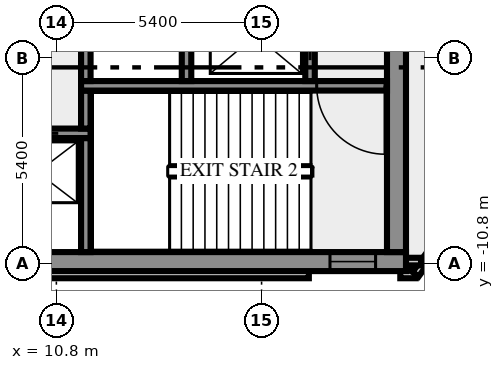
"""IFC4 building model, lengths in metres.
Left out: names, types, materials, properties, quantities, classifications, styles, units other than length and angle.
Written with IfcOpenShell. Run it as: python <this file> out.ifc"""

import sys

from ifc_helpers import new_model, si_unit, direction, frame, frame_2d, origin, place, context, subcontext, project, spatial, rectangle, extrude, element, fill, save


model = new_model("IFC4")
c1 = context("Model", 3, precision=1e-05, world=origin(), true_north=direction((0.0, 1.0)))
c2 = subcontext(c1, "Body", "Model", "MODEL_VIEW")
j1 = project(units=[si_unit("LENGTHUNIT", "METRE"), si_unit("PLANEANGLEUNIT", "RADIAN")], contexts=[c1])
p1 = place(None, origin())
s1 = spatial("IfcSite", under=j1, at=p1, CompositionType="ELEMENT")
p2 = place(p1, origin())
s2 = spatial("IfcBuilding", under=s1, at=p2, CompositionType="ELEMENT")
p3 = place(p2, frame((0.0, 0.0, 202.0)))
s3 = spatial("IfcBuildingStorey", under=s2, at=p3, CompositionType="ELEMENT", Elevation=202.0)
p4 = place(p3, frame((-17.444, -11.088, 0.0), z_axis=(0.0, 0.0, 1.0), x_axis=(1.0, 0.0, 0.0)))
e1 = element("IfcWall", 1, at=p4, inside=s3, PredefinedType="SOLIDWALL", context=c2, shape_type="SweptSolid", body=[
    extrude(rectangle(XDim=34.888, YDim=0.2, at=frame_2d((17.444, 0.0))), origin(), (0.0, 0.0, 1.0), 3.65),
])
p5 = place(p3, frame((19.85, -11.088, 0.0), z_axis=(0.0, 0.0, 1.0), x_axis=(1.0, 0.0, 0.0)))
e2 = element("IfcWall", 2, at=p5, inside=s3, PredefinedType="SOLIDWALL", context=c2, shape_type="SweptSolid", body=[
    extrude(rectangle(XDim=0.406, YDim=0.2, at=frame_2d((0.203, 0.0))), origin(), (0.0, 0.0, 1.0), 3.65),
])
p6 = place(p3, frame((20.253, -11.083, 0.0), z_axis=(0.0, 0.0, 1.0), x_axis=(0.587766567315, 0.809030569476, 0.0)))
e3 = element("IfcWall", 3, at=p6, inside=s3, PredefinedType="SOLIDWALL", context=c2, shape_type="SweptSolid", body=[
    extrude(rectangle(XDim=2.688, YDim=0.2, at=frame_2d((1.344, 0.0))), origin(), (0.0, 0.0, 1.0), 3.65),
])
p7 = place(p3, frame((19.98, -10.75, 0.0), z_axis=(0.0, 0.0, 1.0), x_axis=(1.0, 0.0, 0.0)))
e4 = element("IfcWall", 4, at=p7, inside=s3, PredefinedType="SOLIDWALL", context=c2, shape_type="SweptSolid", body=[
    extrude(rectangle(XDim=0.417, YDim=0.2, at=frame_2d((0.208, 0.0))), origin(), (0.0, 0.0, 1.0), 3.65),
])
p8 = place(p3, frame((-20.0, -10.75, 0.0), z_axis=(0.0, 0.0, 1.0), x_axis=(1.0, 0.0, 0.0)))
e5 = element("IfcWall", 5, at=p8, inside=s3, PredefinedType="SHEAR", context=c2, shape_type="SweptSolid", body=[
    extrude(rectangle(XDim=40.0, YDim=0.5, at=frame_2d((20.0, 0.0))), origin(), (0.0, 0.0, 1.0), 3.65),
])
p9 = place(p8, frame((0.8, 0.0, 1.0)))
e6 = element("IfcOpeningElement", 6, at=p9, cuts=e5, PredefinedType="OPENING", context=c2, shape_type="SweptSolid", body=[
    extrude(rectangle(XDim=1.2, YDim=1.2, at=frame_2d((0.6, 0.6))), frame((0.0, 0.26, 0.0), z_axis=(0.0, -1.0, 0.0), x_axis=(1.0, 0.0, 0.0)), (0.0, 0.0, 1.0), 0.52),
])
p10 = place(p8, frame((38.0, 0.0, 1.0)))
e7 = element("IfcOpeningElement", 7, at=p10, cuts=e5, PredefinedType="OPENING", context=c2, shape_type="SweptSolid", body=[
    extrude(rectangle(XDim=1.2, YDim=1.2, at=frame_2d((0.6, 0.6))), frame((0.0, 0.26, 0.0), z_axis=(0.0, -1.0, 0.0), x_axis=(1.0, 0.0, 0.0)), (0.0, 0.0, 1.0), 0.52),
])
p11 = place(p3, frame((11.575, -10.5, 0.0), z_axis=(0.0, 0.0, 1.0), x_axis=(0.0, 1.0, 0.0)))
e8 = element("IfcWall", 8, at=p11, inside=s3, PredefinedType="SHEAR", context=c2, shape_type="SweptSolid", body=[
    extrude(rectangle(XDim=3.0, YDim=0.25, at=frame_2d((1.5, 0.0))), origin(), (0.0, 0.0, 1.0), 3.65),
])
p12 = place(p3, frame((19.75, -10.5, 0.0), z_axis=(0.0, 0.0, 1.0), x_axis=(0.0, 1.0, 0.0)))
e9 = element("IfcWall", 9, at=p12, inside=s3, PredefinedType="SHEAR", context=c2, shape_type="SweptSolid", body=[
    extrude(rectangle(XDim=8.8, YDim=0.5, at=frame_2d((4.4, 0.0))), origin(), (0.0, 0.0, 1.0), 3.65),
])
p13 = place(p3, frame((11.7, -7.375, 0.0), z_axis=(0.0, 0.0, 1.0), x_axis=(-1.0, 0.0, 0.0)))
e10 = element("IfcWall", 10, at=p13, inside=s3, PredefinedType="SHEAR", context=c2, shape_type="SweptSolid", body=[
    extrude(rectangle(XDim=23.4, YDim=0.25, at=frame_2d((11.7, 0.0))), origin(), (0.0, 0.0, 1.0), 3.65),
])
p14 = place(p13, frame((22.012, 0.0, 0.0)))
e11 = element("IfcOpeningElement", 11, at=p14, cuts=e10, PredefinedType="OPENING", context=c2, shape_type="SweptSolid", body=[
    extrude(rectangle(XDim=0.9, YDim=2.1, at=frame_2d((0.45, 1.05))), frame((0.0, 0.135, 0.0), z_axis=(0.0, -1.0, 0.0), x_axis=(1.0, 0.0, 0.0)), (0.0, 0.0, 1.0), 0.27),
])
p15 = place(p13, frame((20.25, 0.0, 0.0)))
e12 = element("IfcOpeningElement", 12, at=p15, cuts=e10, PredefinedType="OPENING", context=c2, shape_type="SweptSolid", body=[
    extrude(rectangle(XDim=0.9, YDim=2.1, at=frame_2d((0.45, 1.05))), frame((0.0, 0.135, 0.0), z_axis=(0.0, -1.0, 0.0), x_axis=(1.0, 0.0, 0.0)), (0.0, 0.0, 1.0), 0.27),
])
p16 = place(p13, frame((18.25, 0.0, 0.0)))
e13 = element("IfcOpeningElement", 13, at=p16, cuts=e10, PredefinedType="OPENING", context=c2, shape_type="SweptSolid", body=[
    extrude(rectangle(XDim=0.9, YDim=2.1, at=frame_2d((0.45, 1.05))), frame((0.0, 0.135, 0.0), z_axis=(0.0, -1.0, 0.0), x_axis=(1.0, 0.0, 0.0)), (0.0, 0.0, 1.0), 0.27),
])
p17 = place(p13, frame((16.287, 0.0, 0.0)))
e14 = element("IfcOpeningElement", 14, at=p17, cuts=e10, PredefinedType="OPENING", context=c2, shape_type="SweptSolid", body=[
    extrude(rectangle(XDim=0.9, YDim=2.1, at=frame_2d((0.45, 1.05))), frame((0.0, 0.135, 0.0), z_axis=(0.0, -1.0, 0.0), x_axis=(1.0, 0.0, 0.0)), (0.0, 0.0, 1.0), 0.27),
])
p18 = place(p13, frame((14.25, 0.0, 0.0)))
e15 = element("IfcOpeningElement", 15, at=p18, cuts=e10, PredefinedType="OPENING", context=c2, shape_type="SweptSolid", body=[
    extrude(rectangle(XDim=0.9, YDim=2.1, at=frame_2d((0.45, 1.05))), frame((0.0, 0.135, 0.0), z_axis=(0.0, -1.0, 0.0), x_axis=(1.0, 0.0, 0.0)), (0.0, 0.0, 1.0), 0.27),
])
p19 = place(p13, frame((12.125, 0.0, 0.0)))
e16 = element("IfcOpeningElement", 16, at=p19, cuts=e10, PredefinedType="OPENING", context=c2, shape_type="SweptSolid", body=[
    extrude(rectangle(XDim=0.9, YDim=2.1, at=frame_2d((0.45, 1.05))), frame((0.0, 0.135, 0.0), z_axis=(0.0, -1.0, 0.0), x_axis=(1.0, 0.0, 0.0)), (0.0, 0.0, 1.0), 0.27),
])
p20 = place(p13, frame((10.45, 0.0, 0.0)))
e17 = element("IfcOpeningElement", 17, at=p20, cuts=e10, PredefinedType="OPENING", context=c2, shape_type="SweptSolid", body=[
    extrude(rectangle(XDim=0.75, YDim=2.1, at=frame_2d((0.375, 1.05))), frame((0.0, 0.135, 0.0), z_axis=(0.0, -1.0, 0.0), x_axis=(1.0, 0.0, 0.0)), (0.0, 0.0, 1.0), 0.27),
])
p21 = place(p13, frame((8.35, 0.0, 0.0)))
e18 = element("IfcOpeningElement", 18, at=p21, cuts=e10, PredefinedType="OPENING", context=c2, shape_type="SweptSolid", body=[
    extrude(rectangle(XDim=1.1, YDim=2.1, at=frame_2d((0.55, 1.05))), frame((0.0, 0.135, 0.0), z_axis=(0.0, -1.0, 0.0), x_axis=(1.0, 0.0, 0.0)), (0.0, 0.0, 1.0), 0.27),
])
p22 = place(p13, frame((5.85, 0.0, 0.0)))
e19 = element("IfcOpeningElement", 19, at=p22, cuts=e10, PredefinedType="OPENING", context=c2, shape_type="SweptSolid", body=[
    extrude(rectangle(XDim=1.1, YDim=2.1, at=frame_2d((0.55, 1.05))), frame((0.0, 0.135, 0.0), z_axis=(0.0, -1.0, 0.0), x_axis=(1.0, 0.0, 0.0)), (0.0, 0.0, 1.0), 0.27),
])
p23 = place(p13, frame((3.35, 0.0, 0.0)))
e20 = element("IfcOpeningElement", 20, at=p23, cuts=e10, PredefinedType="OPENING", context=c2, shape_type="SweptSolid", body=[
    extrude(rectangle(XDim=1.1, YDim=2.1, at=frame_2d((0.55, 1.05))), frame((0.0, 0.135, 0.0), z_axis=(0.0, -1.0, 0.0), x_axis=(1.0, 0.0, 0.0)), (0.0, 0.0, 1.0), 0.27),
])
p24 = place(p13, frame((0.85, 0.0, 0.0)))
e21 = element("IfcOpeningElement", 21, at=p24, cuts=e10, PredefinedType="OPENING", context=c2, shape_type="SweptSolid", body=[
    extrude(rectangle(XDim=1.1, YDim=2.1, at=frame_2d((0.55, 1.05))), frame((0.0, 0.135, 0.0), z_axis=(0.0, -1.0, 0.0), x_axis=(1.0, 0.0, 0.0)), (0.0, 0.0, 1.0), 0.27),
])
p25 = place(p3, frame((11.575, -7.25, 0.0), z_axis=(0.0, 0.0, 1.0), x_axis=(0.0, 1.0, 0.0)))
e22 = element("IfcWall", 22, at=p25, inside=s3, PredefinedType="SHEAR", context=c2, shape_type="SweptSolid", body=[
    extrude(rectangle(XDim=1.0, YDim=0.25, at=frame_2d((0.5, 0.0))), origin(), (0.0, 0.0, 1.0), 3.65),
])
p26 = place(p3, frame((19.5, -6.125, 0.0), z_axis=(0.0, 0.0, 1.0), x_axis=(-1.0, 0.0, 0.0)))
e23 = element("IfcWall", 23, at=p26, inside=s3, PredefinedType="SHEAR", context=c2, shape_type="SweptSolid", body=[
    extrude(rectangle(XDim=8.05, YDim=0.25, at=frame_2d((4.025, 0.0))), origin(), (0.0, 0.0, 1.0), 3.65),
])
p27 = place(p26, frame((0.05, 0.0, 0.0)))
e24 = element("IfcOpeningElement", 24, at=p27, cuts=e23, PredefinedType="OPENING", context=c2, shape_type="SweptSolid", body=[
    extrude(rectangle(XDim=1.8, YDim=2.1, at=frame_2d((0.9, 1.05))), frame((0.0, 0.135, 0.0), z_axis=(0.0, -1.0, 0.0), x_axis=(1.0, 0.0, 0.0)), (0.0, 0.0, 1.0), 0.27),
])
p28 = place(p3, frame((11.575, -6.0, 0.0), z_axis=(0.0, 0.0, 1.0), x_axis=(0.0, 1.0, 0.0)))
e25 = element("IfcWall", 25, at=p28, inside=s3, PredefinedType="SHEAR", context=c2, shape_type="SweptSolid", body=[
    extrude(rectangle(XDim=1.75, YDim=0.25, at=frame_2d((0.875, 0.0))), origin(), (0.0, 0.0, 1.0), 3.65),
])
p29 = place(p3, frame((14.225, -6.0, 0.0), z_axis=(0.0, 0.0, 1.0), x_axis=(0.0, 1.0, 0.0)))
e26 = element("IfcWall", 26, at=p29, inside=s3, PredefinedType="SHEAR", context=c2, shape_type="SweptSolid", body=[
    extrude(rectangle(XDim=4.3, YDim=0.25, at=frame_2d((2.15, 0.0))), origin(), (0.0, 0.0, 1.0), 3.65),
])
p30 = place(p3, frame((17.475, -6.0, 0.0), z_axis=(0.0, 0.0, 1.0), x_axis=(0.0, 1.0, 0.0)))
e27 = element("IfcWall", 27, at=p30, inside=s3, PredefinedType="SHEAR", context=c2, shape_type="SweptSolid", body=[
    extrude(rectangle(XDim=4.3, YDim=0.25, at=frame_2d((2.15, 0.0))), origin(), (0.0, 0.0, 1.0), 3.65),
])
p31 = place(p30, frame((0.55, 0.0, 0.0)))
e28 = element("IfcOpeningElement", 28, at=p31, cuts=e27, PredefinedType="OPENING", context=c2, shape_type="SweptSolid", body=[
    extrude(rectangle(XDim=1.3, YDim=2.1, at=frame_2d((0.65, 1.05))), frame((0.0, 0.135, 0.0), z_axis=(0.0, -1.0, 0.0), x_axis=(1.0, 0.0, 0.0)), (0.0, 0.0, 1.0), 0.27),
])
p32 = place(p10, origin())
e29 = element("IfcWindow", 29, at=p32, inside=s3, PartitioningType="SINGLE_PANEL", PredefinedType="WINDOW", context=c2, shape_type="SweptSolid", body=[
    extrude(rectangle(XDim=1.2, YDim=1.2, at=frame_2d((0.6, 0.6))), frame((0.0, 0.03, 0.0), z_axis=(0.0, -1.0, 0.0), x_axis=(1.0, 0.0, 0.0)), (0.0, 0.0, 1.0), 0.06),
])
fill(e7, e29)
p33 = place(p24, origin())
e30 = element("IfcDoor", 30, at=p33, inside=s3, OperationType="DOUBLE_DOOR_SLIDING", PredefinedType="DOOR", context=c2, shape_type="SweptSolid", body=[
    extrude(rectangle(XDim=1.1, YDim=2.1, at=frame_2d((0.55, 1.05))), frame((0.0, 0.025, 0.0), z_axis=(0.0, -1.0, 0.0), x_axis=(1.0, 0.0, 0.0)), (0.0, 0.0, 1.0), 0.05),
])
fill(e21, e30)
p34 = place(p27, origin())
e31 = element("IfcDoor", 31, at=p34, inside=s3, OperationType="DOUBLE_DOOR_SINGLE_SWING", PredefinedType="DOOR", context=c2, shape_type="SweptSolid", body=[
    extrude(rectangle(XDim=1.8, YDim=2.1, at=frame_2d((0.9, 1.05))), frame((0.0, 0.025, 0.0), z_axis=(0.0, -1.0, 0.0), x_axis=(1.0, 0.0, 0.0)), (0.0, 0.0, 1.0), 0.05),
])
fill(e24, e31)
p35 = place(p31, origin())
e32 = element("IfcDoor", 32, at=p35, inside=s3, OperationType="DOUBLE_DOOR_SLIDING", PredefinedType="DOOR", context=c2, shape_type="SweptSolid", body=[
    extrude(rectangle(XDim=1.3, YDim=2.1, at=frame_2d((0.65, 1.05))), frame((0.0, 0.025, 0.0), z_axis=(0.0, -1.0, 0.0), x_axis=(1.0, 0.0, 0.0)), (0.0, 0.0, 1.0), 0.05),
])
fill(e28, e32)
save(model, sys.argv[1])
